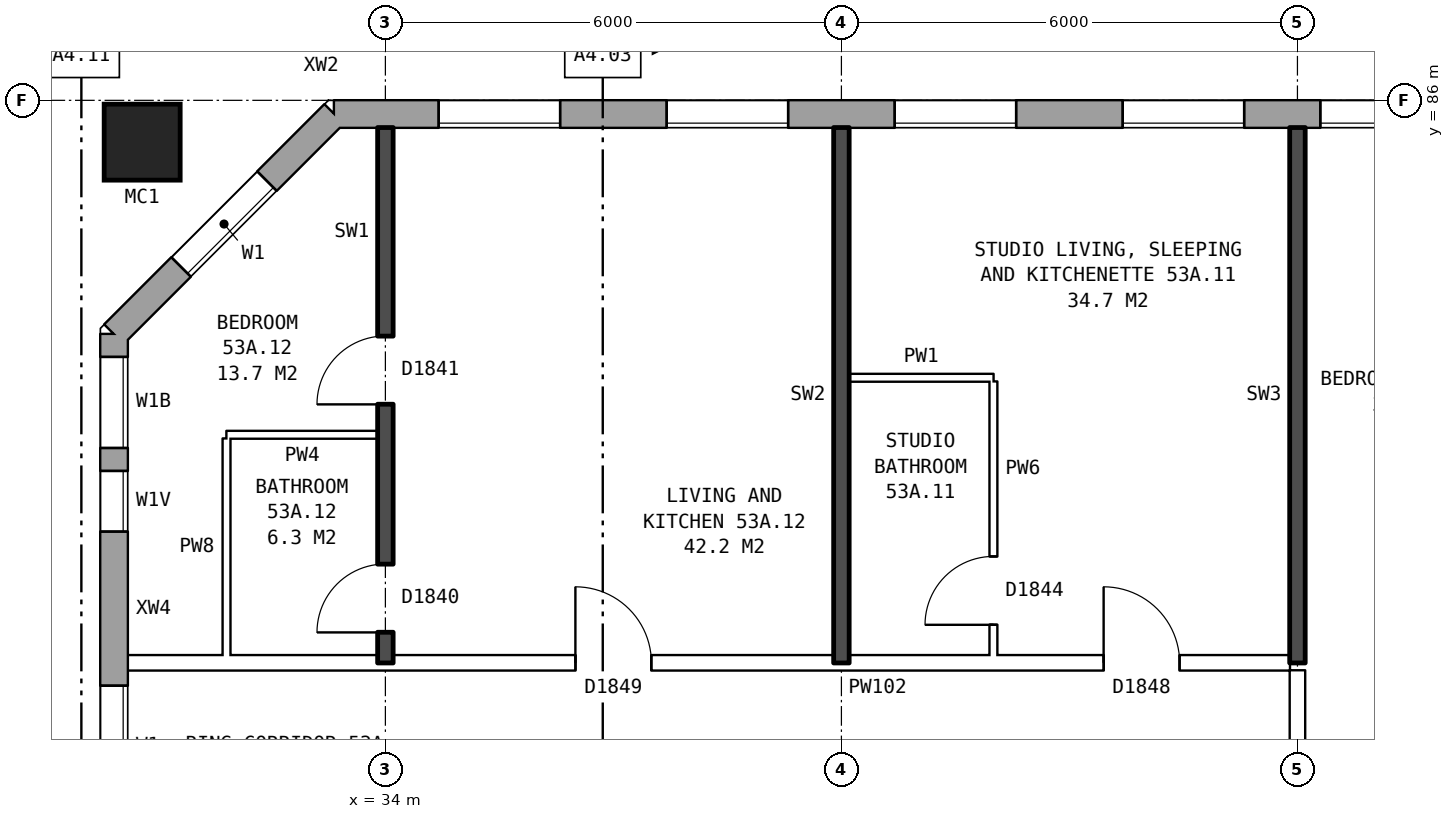
"""IFC4 building model, lengths in metres.
Left out: names, types, materials, properties, quantities, classifications, styles, units other than length and angle.
Written with IfcOpenShell. Run it as: python <this file> out.ifc"""

import sys

from ifc_helpers import new_model, si_unit, direction, frame, frame_2d, origin, origin_2d, place, context, subcontext, project, spatial, rectangle, hollow_rectangle, extrude, element, fill, save


model = new_model("IFC4")
c1 = context("Model", 3, precision=1e-05, world=origin(), true_north=direction((0.0, 1.0)))
c2 = subcontext(c1, "Body", "Model", "MODEL_VIEW")
j1 = project(units=[si_unit("LENGTHUNIT", "METRE"), si_unit("PLANEANGLEUNIT", "RADIAN")], contexts=[c1])
p1 = place(None, origin())
s1 = spatial("IfcSite", under=j1, at=p1, CompositionType="ELEMENT")
p2 = place(p1, origin())
s2 = spatial("IfcBuilding", under=s1, at=p2, CompositionType="ELEMENT")
p3 = place(p2, frame((0.0, 0.0, 188.2)))
s3 = spatial("IfcBuildingStorey", under=s2, at=p3, CompositionType="ELEMENT", Elevation=188.2)
p4 = place(p3, frame((30.8, 85.45, 0.0), z_axis=(0.0, 0.0, 1.0), x_axis=(1.0, 0.0, 0.0)))
e1 = element("IfcColumn", 1, at=p4, inside=s3, PredefinedType="COLUMN", context=c2, shape_type="SweptSolid", body=[
    extrude(hollow_rectangle(XDim=1.0, YDim=1.0, WallThickness=0.055, at=origin_2d()), origin(), (0.0, 0.0, 1.0), 3.1),
])
p5 = place(p3, frame((72.925, 85.82, 0.0), z_axis=(0.0, 0.0, 1.0), x_axis=(-1.0, 0.0, 0.0)))
e2 = element("IfcWall", 2, at=p5, inside=s3, PredefinedType="STANDARD", context=c2, shape_type="SweptSolid", body=[
    extrude(rectangle(XDim=39.601, YDim=0.36, at=frame_2d((19.8, 0.0))), origin(), (0.0, 0.0, 1.0), 2.85),
])
p6 = place(p5, frame((0.625, 0.0, 0.8)))
e3 = element("IfcOpeningElement", 3, at=p6, cuts=e2, PredefinedType="OPENING", context=c2, shape_type="SweptSolid", body=[
    extrude(rectangle(XDim=1.6, YDim=1.8, at=frame_2d((0.8, 0.9))), frame((0.0, 0.19, 0.0), z_axis=(0.0, -1.0, 0.0), x_axis=(1.0, 0.0, 0.0)), (0.0, 0.0, 1.0), 0.38),
])
p7 = place(p5, frame((3.625, 0.0, 0.8)))
e4 = element("IfcOpeningElement", 4, at=p7, cuts=e2, PredefinedType="OPENING", context=c2, shape_type="SweptSolid", body=[
    extrude(rectangle(XDim=1.6, YDim=1.8, at=frame_2d((0.8, 0.9))), frame((0.0, 0.19, 0.0), z_axis=(0.0, -1.0, 0.0), x_axis=(1.0, 0.0, 0.0)), (0.0, 0.0, 1.0), 0.38),
])
p8 = place(p5, frame((6.625, 0.0, 0.8)))
e5 = element("IfcOpeningElement", 5, at=p8, cuts=e2, PredefinedType="OPENING", context=c2, shape_type="SweptSolid", body=[
    extrude(rectangle(XDim=1.6, YDim=1.8, at=frame_2d((0.8, 0.9))), frame((0.0, 0.19, 0.0), z_axis=(0.0, -1.0, 0.0), x_axis=(1.0, 0.0, 0.0)), (0.0, 0.0, 1.0), 0.38),
])
p9 = place(p5, frame((9.625, 0.0, 0.8)))
e6 = element("IfcOpeningElement", 6, at=p9, cuts=e2, PredefinedType="OPENING", context=c2, shape_type="SweptSolid", body=[
    extrude(rectangle(XDim=1.6, YDim=1.8, at=frame_2d((0.8, 0.9))), frame((0.0, 0.19, 0.0), z_axis=(0.0, -1.0, 0.0), x_axis=(1.0, 0.0, 0.0)), (0.0, 0.0, 1.0), 0.38),
])
p10 = place(p5, frame((12.625, 0.0, 0.8)))
e7 = element("IfcOpeningElement", 7, at=p10, cuts=e2, PredefinedType="OPENING", context=c2, shape_type="SweptSolid", body=[
    extrude(rectangle(XDim=1.6, YDim=1.8, at=frame_2d((0.8, 0.9))), frame((0.0, 0.19, 0.0), z_axis=(0.0, -1.0, 0.0), x_axis=(1.0, 0.0, 0.0)), (0.0, 0.0, 1.0), 0.38),
])
p11 = place(p5, frame((15.575, 0.0, 0.15)))
e8 = element("IfcOpeningElement", 8, at=p11, cuts=e2, PredefinedType="OPENING", context=c2, shape_type="SweptSolid", body=[
    extrude(rectangle(XDim=0.6, YDim=0.9, at=frame_2d((0.3, 0.45))), frame((0.0, 0.19, 0.0), z_axis=(0.0, -1.0, 0.0), x_axis=(1.0, 0.0, 0.0)), (0.0, 0.0, 1.0), 0.38),
])
p12 = place(p5, frame((18.625, 0.0, 0.8)))
e9 = element("IfcOpeningElement", 9, at=p12, cuts=e2, PredefinedType="OPENING", context=c2, shape_type="SweptSolid", body=[
    extrude(rectangle(XDim=1.6, YDim=1.8, at=frame_2d((0.8, 0.9))), frame((0.0, 0.19, 0.0), z_axis=(0.0, -1.0, 0.0), x_axis=(1.0, 0.0, 0.0)), (0.0, 0.0, 1.0), 0.38),
])
p13 = place(p5, frame((21.125, 0.0, 0.8)))
e10 = element("IfcOpeningElement", 10, at=p13, cuts=e2, PredefinedType="OPENING", context=c2, shape_type="SweptSolid", body=[
    extrude(rectangle(XDim=1.2, YDim=1.8, at=frame_2d((0.6, 0.9))), frame((0.0, 0.19, 0.0), z_axis=(0.0, -1.0, 0.0), x_axis=(1.0, 0.0, 0.0)), (0.0, 0.0, 1.0), 0.38),
])
p14 = place(p5, frame((24.525, 0.0, 1.7)))
e11 = element("IfcOpeningElement", 11, at=p14, cuts=e2, PredefinedType="OPENING", context=c2, shape_type="SweptSolid", body=[
    extrude(rectangle(XDim=0.6, YDim=0.9, at=frame_2d((0.3, 0.45))), frame((0.0, 0.19, 0.0), z_axis=(0.0, -1.0, 0.0), x_axis=(1.0, 0.0, 0.0)), (0.0, 0.0, 1.0), 0.38),
])
p15 = place(p5, frame((27.625, 0.0, 0.8)))
e12 = element("IfcOpeningElement", 12, at=p15, cuts=e2, PredefinedType="OPENING", context=c2, shape_type="SweptSolid", body=[
    extrude(rectangle(XDim=1.6, YDim=1.8, at=frame_2d((0.8, 0.9))), frame((0.0, 0.19, 0.0), z_axis=(0.0, -1.0, 0.0), x_axis=(1.0, 0.0, 0.0)), (0.0, 0.0, 1.0), 0.38),
])
p16 = place(p5, frame((30.625, 0.0, 0.8)))
e13 = element("IfcOpeningElement", 13, at=p16, cuts=e2, PredefinedType="OPENING", context=c2, shape_type="SweptSolid", body=[
    extrude(rectangle(XDim=1.6, YDim=1.8, at=frame_2d((0.8, 0.9))), frame((0.0, 0.19, 0.0), z_axis=(0.0, -1.0, 0.0), x_axis=(1.0, 0.0, 0.0)), (0.0, 0.0, 1.0), 0.38),
])
p17 = place(p5, frame((33.625, 0.0, 0.8)))
e14 = element("IfcOpeningElement", 14, at=p17, cuts=e2, PredefinedType="OPENING", context=c2, shape_type="SweptSolid", body=[
    extrude(rectangle(XDim=1.6, YDim=1.8, at=frame_2d((0.8, 0.9))), frame((0.0, 0.19, 0.0), z_axis=(0.0, -1.0, 0.0), x_axis=(1.0, 0.0, 0.0)), (0.0, 0.0, 1.0), 0.38),
])
p18 = place(p5, frame((36.625, 0.0, 0.8)))
e15 = element("IfcOpeningElement", 15, at=p18, cuts=e2, PredefinedType="OPENING", context=c2, shape_type="SweptSolid", body=[
    extrude(rectangle(XDim=1.6, YDim=1.8, at=frame_2d((0.8, 0.9))), frame((0.0, 0.19, 0.0), z_axis=(0.0, -1.0, 0.0), x_axis=(1.0, 0.0, 0.0)), (0.0, 0.0, 1.0), 0.38),
])
p19 = place(p5, frame((16.475, 0.0, 0.15)))
e16 = element("IfcOpeningElement", 16, at=p19, cuts=e2, PredefinedType="OPENING", context=c2, shape_type="SweptSolid", body=[
    extrude(rectangle(XDim=1.2, YDim=1.8, at=frame_2d((0.6, 0.9))), frame((0.0, 0.19, 0.0), z_axis=(0.0, -1.0, 0.0), x_axis=(1.0, 0.0, 0.0)), (0.0, 0.0, 1.0), 0.38),
])
p20 = place(p5, frame((22.625, 0.0, 0.8)))
e17 = element("IfcOpeningElement", 17, at=p20, cuts=e2, PredefinedType="OPENING", context=c2, shape_type="SweptSolid", body=[
    extrude(rectangle(XDim=0.6, YDim=0.9, at=frame_2d((0.3, 0.45))), frame((0.0, 0.19, 0.0), z_axis=(0.0, -1.0, 0.0), x_axis=(1.0, 0.0, 0.0)), (0.0, 0.0, 1.0), 0.38),
])
p21 = place(p5, frame((25.425, 0.0, 0.8)))
e18 = element("IfcOpeningElement", 18, at=p21, cuts=e2, PredefinedType="OPENING", context=c2, shape_type="SweptSolid", body=[
    extrude(rectangle(XDim=1.2, YDim=1.8, at=frame_2d((0.6, 0.9))), frame((0.0, 0.19, 0.0), z_axis=(0.0, -1.0, 0.0), x_axis=(1.0, 0.0, 0.0)), (0.0, 0.0, 1.0), 0.38),
])
p22 = place(p3, frame((33.325, 85.82, 0.0), z_axis=(0.0, 0.0, 1.0), x_axis=(-0.707106781187, -0.707106781187, 0.0)))
e19 = element("IfcWall", 19, at=p22, inside=s3, PredefinedType="STANDARD", context=c2, shape_type="SweptSolid", body=[
    extrude(rectangle(XDim=4.094, YDim=0.36, at=frame_2d((2.047, 0.0))), origin(), (0.0, 0.0, 1.0), 2.85),
])
p23 = place(p22, frame((1.247, 0.0, 0.8)))
e20 = element("IfcOpeningElement", 20, at=p23, cuts=e19, PredefinedType="OPENING", context=c2, shape_type="SweptSolid", body=[
    extrude(rectangle(XDim=1.6, YDim=1.8, at=frame_2d((0.8, 0.9))), frame((0.0, 0.19, 0.0), z_axis=(0.0, -1.0, 0.0), x_axis=(1.0, 0.0, 0.0)), (0.0, 0.0, 1.0), 0.38),
])
p24 = place(p3, frame((30.43, 82.925, 0.0), z_axis=(0.0, 0.0, 1.0), x_axis=(0.0, -1.0, 0.0)))
e21 = element("IfcWall", 21, at=p24, inside=s3, PredefinedType="STANDARD", context=c2, shape_type="SweptSolid", body=[
    extrude(rectangle(XDim=25.851, YDim=0.36, at=frame_2d((12.925, 0.0))), origin(), (0.0, 0.0, 1.0), 2.85),
])
p25 = place(p24, frame((0.3, 0.0, 0.8)))
e22 = element("IfcOpeningElement", 22, at=p25, cuts=e21, PredefinedType="OPENING", context=c2, shape_type="SweptSolid", body=[
    extrude(rectangle(XDim=1.2, YDim=1.8, at=frame_2d((0.6, 0.9))), frame((0.0, 0.19, 0.0), z_axis=(0.0, -1.0, 0.0), x_axis=(1.0, 0.0, 0.0)), (0.0, 0.0, 1.0), 0.38),
])
p26 = place(p24, frame((4.625, 0.0, 0.8)))
e23 = element("IfcOpeningElement", 23, at=p26, cuts=e21, PredefinedType="OPENING", context=c2, shape_type="SweptSolid", body=[
    extrude(rectangle(XDim=1.6, YDim=1.8, at=frame_2d((0.8, 0.9))), frame((0.0, 0.19, 0.0), z_axis=(0.0, -1.0, 0.0), x_axis=(1.0, 0.0, 0.0)), (0.0, 0.0, 1.0), 0.38),
])
p27 = place(p24, frame((7.625, 0.0, 0.8)))
e24 = element("IfcOpeningElement", 24, at=p27, cuts=e21, PredefinedType="OPENING", context=c2, shape_type="SweptSolid", body=[
    extrude(rectangle(XDim=1.6, YDim=1.8, at=frame_2d((0.8, 0.9))), frame((0.0, 0.19, 0.0), z_axis=(0.0, -1.0, 0.0), x_axis=(1.0, 0.0, 0.0)), (0.0, 0.0, 1.0), 0.38),
])
p28 = place(p24, frame((10.625, 0.0, 0.8)))
e25 = element("IfcOpeningElement", 25, at=p28, cuts=e21, PredefinedType="OPENING", context=c2, shape_type="SweptSolid", body=[
    extrude(rectangle(XDim=1.6, YDim=1.8, at=frame_2d((0.8, 0.9))), frame((0.0, 0.19, 0.0), z_axis=(0.0, -1.0, 0.0), x_axis=(1.0, 0.0, 0.0)), (0.0, 0.0, 1.0), 0.38),
])
p29 = place(p24, frame((13.625, 0.0, 0.8)))
e26 = element("IfcOpeningElement", 26, at=p29, cuts=e21, PredefinedType="OPENING", context=c2, shape_type="SweptSolid", body=[
    extrude(rectangle(XDim=1.6, YDim=1.8, at=frame_2d((0.8, 0.9))), frame((0.0, 0.19, 0.0), z_axis=(0.0, -1.0, 0.0), x_axis=(1.0, 0.0, 0.0)), (0.0, 0.0, 1.0), 0.38),
])
p30 = place(p24, frame((16.625, 0.0, 0.8)))
e27 = element("IfcOpeningElement", 27, at=p30, cuts=e21, PredefinedType="OPENING", context=c2, shape_type="SweptSolid", body=[
    extrude(rectangle(XDim=1.6, YDim=1.8, at=frame_2d((0.8, 0.9))), frame((0.0, 0.19, 0.0), z_axis=(0.0, -1.0, 0.0), x_axis=(1.0, 0.0, 0.0)), (0.0, 0.0, 1.0), 0.38),
])
p31 = place(p24, frame((19.625, 0.0, 0.8)))
e28 = element("IfcOpeningElement", 28, at=p31, cuts=e21, PredefinedType="OPENING", context=c2, shape_type="SweptSolid", body=[
    extrude(rectangle(XDim=1.6, YDim=1.8, at=frame_2d((0.8, 0.9))), frame((0.0, 0.19, 0.0), z_axis=(0.0, -1.0, 0.0), x_axis=(1.0, 0.0, 0.0)), (0.0, 0.0, 1.0), 0.38),
])
p32 = place(p24, frame((23.075, 0.0, 0.8)))
e29 = element("IfcOpeningElement", 29, at=p32, cuts=e21, PredefinedType="OPENING", context=c2, shape_type="SweptSolid", body=[
    extrude(rectangle(XDim=1.0, YDim=0.9, at=frame_2d((0.5, 0.45))), frame((0.0, 0.19, 0.0), z_axis=(0.0, -1.0, 0.0), x_axis=(1.0, 0.0, 0.0)), (0.0, 0.0, 1.0), 0.38),
])
p33 = place(p24, frame((1.8, 0.0, 0.8)))
e30 = element("IfcOpeningElement", 30, at=p33, cuts=e21, PredefinedType="OPENING", context=c2, shape_type="SweptSolid", body=[
    extrude(rectangle(XDim=0.8, YDim=0.9, at=frame_2d((0.4, 0.45))), frame((0.0, 0.19, 0.0), z_axis=(0.0, -1.0, 0.0), x_axis=(1.0, 0.0, 0.0)), (0.0, 0.0, 1.0), 0.38),
])
p34 = place(p24, frame((24.375, 0.0, 0.8)))
e31 = element("IfcOpeningElement", 31, at=p34, cuts=e21, PredefinedType="OPENING", context=c2, shape_type="SweptSolid", body=[
    extrude(rectangle(XDim=1.0, YDim=1.8, at=frame_2d((0.5, 0.9))), frame((0.0, 0.19, 0.0), z_axis=(0.0, -1.0, 0.0), x_axis=(1.0, 0.0, 0.0)), (0.0, 0.0, 1.0), 0.38),
])
p35 = place(p3, frame((30.61, 78.6, 0.0), z_axis=(0.0, 0.0, 1.0), x_axis=(1.0, 0.0, 0.0)))
e32 = element("IfcWall", 32, at=p35, inside=s3, PredefinedType="PARTITIONING", context=c2, shape_type="SweptSolid", body=[
    extrude(rectangle(XDim=15.29, YDim=0.2, at=frame_2d((7.645, 0.0))), origin(), (0.0, 0.0, 1.0), 2.85),
])
p36 = place(p35, frame((12.84, 0.0, 0.0)))
e33 = element("IfcOpeningElement", 33, at=p36, cuts=e32, PredefinedType="OPENING", context=c2, shape_type="SweptSolid", body=[
    extrude(rectangle(XDim=1.0, YDim=2.1, at=frame_2d((0.5, 1.05))), frame((0.0, 0.11, 0.0), z_axis=(0.0, -1.0, 0.0), x_axis=(1.0, 0.0, 0.0)), (0.0, 0.0, 1.0), 0.22),
])
p37 = place(p35, frame((5.89, 0.0, 0.0)))
e34 = element("IfcOpeningElement", 34, at=p37, cuts=e32, PredefinedType="OPENING", context=c2, shape_type="SweptSolid", body=[
    extrude(rectangle(XDim=1.0, YDim=2.1, at=frame_2d((0.5, 1.05))), frame((0.0, 0.11, 0.0), z_axis=(0.0, -1.0, 0.0), x_axis=(1.0, 0.0, 0.0)), (0.0, 0.0, 1.0), 0.22),
])
p38 = place(p3, frame((31.91, 81.6, 0.0), z_axis=(0.0, 0.0, 1.0), x_axis=(1.0, 0.0, 0.0)))
e35 = element("IfcWall", 35, at=p38, inside=s3, PredefinedType="PARTITIONING", context=c2, shape_type="SweptSolid", body=[
    extrude(rectangle(XDim=1.99, YDim=0.1, at=frame_2d((0.995, 0.0))), origin(), (0.0, 0.0, 1.0), 2.85),
])
p39 = place(p3, frame((40.1, 82.35, 0.0), z_axis=(0.0, 0.0, 1.0), x_axis=(1.0, 0.0, 0.0)))
e36 = element("IfcWall", 36, at=p39, inside=s3, PredefinedType="PARTITIONING", context=c2, shape_type="SweptSolid", body=[
    extrude(rectangle(XDim=1.9, YDim=0.1, at=frame_2d((0.95, 0.0))), origin(), (0.0, 0.0, 1.0), 2.85),
])
p40 = place(p3, frame((31.91, 78.7, 0.0), z_axis=(0.0, 0.0, 1.0), x_axis=(0.0, 1.0, 0.0)))
e37 = element("IfcWall", 37, at=p40, inside=s3, PredefinedType="PARTITIONING", context=c2, shape_type="SweptSolid", body=[
    extrude(rectangle(XDim=2.85, YDim=0.1, at=frame_2d((1.425, 0.0))), origin(), (0.0, 0.0, 1.0), 2.85),
])
p41 = place(p3, frame((34.0, 78.6, 0.0), z_axis=(0.0, 0.0, 1.0), x_axis=(0.0, 1.0, 0.0)))
e38 = element("IfcWall", 38, at=p41, inside=s3, PredefinedType="SOLIDWALL", context=c2, shape_type="SweptSolid", body=[
    extrude(rectangle(XDim=7.04, YDim=0.2, at=frame_2d((3.52, 0.0))), origin(), (0.0, 0.0, 1.0), 2.85),
])
p42 = place(p41, frame((3.4, 0.0, 0.0)))
e39 = element("IfcOpeningElement", 39, at=p42, cuts=e38, PredefinedType="OPENING", context=c2, shape_type="SweptSolid", body=[
    extrude(rectangle(XDim=0.9, YDim=2.1, at=frame_2d((0.45, 1.05))), frame((0.0, 0.11, 0.0), z_axis=(0.0, -1.0, 0.0), x_axis=(1.0, 0.0, 0.0)), (0.0, 0.0, 1.0), 0.22),
])
p43 = place(p41, frame((0.4, 0.0, 0.0)))
e40 = element("IfcOpeningElement", 40, at=p43, cuts=e38, PredefinedType="OPENING", context=c2, shape_type="SweptSolid", body=[
    extrude(rectangle(XDim=0.9, YDim=2.1, at=frame_2d((0.45, 1.05))), frame((0.0, 0.11, 0.0), z_axis=(0.0, -1.0, 0.0), x_axis=(1.0, 0.0, 0.0)), (0.0, 0.0, 1.0), 0.22),
])
p44 = place(p3, frame((40.0, 78.6, 0.0), z_axis=(0.0, 0.0, 1.0), x_axis=(0.0, 1.0, 0.0)))
e41 = element("IfcWall", 41, at=p44, inside=s3, PredefinedType="SOLIDWALL", context=c2, shape_type="SweptSolid", body=[
    extrude(rectangle(XDim=7.04, YDim=0.2, at=frame_2d((3.52, 0.0))), origin(), (0.0, 0.0, 1.0), 2.85),
])
p45 = place(p3, frame((42.0, 78.7, 0.0), z_axis=(0.0, 0.0, 1.0), x_axis=(0.0, 1.0, 0.0)))
e42 = element("IfcWall", 42, at=p45, inside=s3, PredefinedType="PARTITIONING", context=c2, shape_type="SweptSolid", body=[
    extrude(rectangle(XDim=3.6, YDim=0.1, at=frame_2d((1.8, 0.0))), origin(), (0.0, 0.0, 1.0), 2.85),
])
p46 = place(p45, frame((0.4, 0.0, 0.0)))
e43 = element("IfcOpeningElement", 43, at=p46, cuts=e42, PredefinedType="OPENING", context=c2, shape_type="SweptSolid", body=[
    extrude(rectangle(XDim=0.9, YDim=2.1, at=frame_2d((0.45, 1.05))), frame((0.0, 0.06, 0.0), z_axis=(0.0, -1.0, 0.0), x_axis=(1.0, 0.0, 0.0)), (0.0, 0.0, 1.0), 0.12),
])
p47 = place(p3, frame((46.0, 76.3, 0.0), z_axis=(0.0, 0.0, 1.0), x_axis=(0.0, 1.0, 0.0)))
e44 = element("IfcWall", 44, at=p47, inside=s3, PredefinedType="PARTITIONING", context=c2, shape_type="SweptSolid", body=[
    extrude(rectangle(XDim=2.2, YDim=0.2, at=frame_2d((1.1, 0.0))), origin(), (0.0, 0.0, 1.0), 2.85),
])
p48 = place(p3, frame((46.0, 78.6, 0.0), z_axis=(0.0, 0.0, 1.0), x_axis=(0.0, 1.0, 0.0)))
e45 = element("IfcWall", 45, at=p48, inside=s3, PredefinedType="SOLIDWALL", context=c2, shape_type="SweptSolid", body=[
    extrude(rectangle(XDim=7.04, YDim=0.2, at=frame_2d((3.52, 0.0))), origin(), (0.0, 0.0, 1.0), 2.85),
])
p49 = place(p15, origin())
e46 = element("IfcWindow", 46, at=p49, inside=s3, PartitioningType="SINGLE_PANEL", PredefinedType="WINDOW", context=c2, shape_type="SweptSolid", body=[
    extrude(rectangle(XDim=1.6, YDim=1.8, at=frame_2d((0.8, 0.9))), frame((0.0, 0.15, 0.0), z_axis=(0.0, -1.0, 0.0), x_axis=(1.0, 0.0, 0.0)), (0.0, 0.0, 1.0), 0.06),
])
fill(e12, e46)
p50 = place(p16, origin())
e47 = element("IfcWindow", 47, at=p50, inside=s3, PartitioningType="SINGLE_PANEL", PredefinedType="WINDOW", context=c2, shape_type="SweptSolid", body=[
    extrude(rectangle(XDim=1.6, YDim=1.8, at=frame_2d((0.8, 0.9))), frame((0.0, 0.15, 0.0), z_axis=(0.0, -1.0, 0.0), x_axis=(1.0, 0.0, 0.0)), (0.0, 0.0, 1.0), 0.06),
])
fill(e13, e47)
p51 = place(p17, origin())
e48 = element("IfcWindow", 48, at=p51, inside=s3, PartitioningType="SINGLE_PANEL", PredefinedType="WINDOW", context=c2, shape_type="SweptSolid", body=[
    extrude(rectangle(XDim=1.6, YDim=1.8, at=frame_2d((0.8, 0.9))), frame((0.0, 0.15, 0.0), z_axis=(0.0, -1.0, 0.0), x_axis=(1.0, 0.0, 0.0)), (0.0, 0.0, 1.0), 0.06),
])
fill(e14, e48)
p52 = place(p18, origin())
e49 = element("IfcWindow", 49, at=p52, inside=s3, PartitioningType="SINGLE_PANEL", PredefinedType="WINDOW", context=c2, shape_type="SweptSolid", body=[
    extrude(rectangle(XDim=1.6, YDim=1.8, at=frame_2d((0.8, 0.9))), frame((0.0, 0.15, 0.0), z_axis=(0.0, -1.0, 0.0), x_axis=(1.0, 0.0, 0.0)), (0.0, 0.0, 1.0), 0.06),
])
fill(e15, e49)
p53 = place(p23, origin())
e50 = element("IfcWindow", 50, at=p53, inside=s3, PartitioningType="SINGLE_PANEL", PredefinedType="WINDOW", context=c2, shape_type="SweptSolid", body=[
    extrude(rectangle(XDim=1.6, YDim=1.8, at=frame_2d((0.8, 0.9))), frame((0.0, 0.15, 0.0), z_axis=(0.0, -1.0, 0.0), x_axis=(1.0, 0.0, 0.0)), (0.0, 0.0, 1.0), 0.06),
])
fill(e20, e50)
p54 = place(p25, origin())
e51 = element("IfcWindow", 51, at=p54, inside=s3, PartitioningType="SINGLE_PANEL", PredefinedType="WINDOW", context=c2, shape_type="SweptSolid", body=[
    extrude(rectangle(XDim=1.2, YDim=1.8, at=frame_2d((0.6, 0.9))), frame((0.0, 0.15, 0.0), z_axis=(0.0, -1.0, 0.0), x_axis=(1.0, 0.0, 0.0)), (0.0, 0.0, 1.0), 0.06),
])
fill(e22, e51)
p55 = place(p26, origin())
e52 = element("IfcWindow", 52, at=p55, inside=s3, PartitioningType="SINGLE_PANEL", PredefinedType="WINDOW", context=c2, shape_type="SweptSolid", body=[
    extrude(rectangle(XDim=1.6, YDim=1.8, at=frame_2d((0.8, 0.9))), frame((0.0, 0.15, 0.0), z_axis=(0.0, -1.0, 0.0), x_axis=(1.0, 0.0, 0.0)), (0.0, 0.0, 1.0), 0.06),
])
fill(e23, e52)
p56 = place(p36, origin())
e53 = element("IfcDoor", 53, at=p56, inside=s3, OperationType="SINGLE_SWING_LEFT", PredefinedType="DOOR", context=c2, shape_type="SweptSolid", body=[
    extrude(rectangle(XDim=1.0, YDim=2.1, at=frame_2d((0.5, 1.05))), frame((0.0, 0.025, 0.0), z_axis=(0.0, -1.0, 0.0), x_axis=(1.0, 0.0, 0.0)), (0.0, 0.0, 1.0), 0.05),
])
fill(e33, e53)
p57 = place(p46, origin())
e54 = element("IfcDoor", 54, at=p57, inside=s3, OperationType="SINGLE_SWING_LEFT", PredefinedType="DOOR", context=c2, shape_type="SweptSolid", body=[
    extrude(rectangle(XDim=0.9, YDim=2.1, at=frame_2d((0.45, 1.05))), frame((0.0, 0.025, 0.0), z_axis=(0.0, -1.0, 0.0), x_axis=(1.0, 0.0, 0.0)), (0.0, 0.0, 1.0), 0.05),
])
fill(e43, e54)
p58 = place(p42, origin())
e55 = element("IfcDoor", 55, at=p58, inside=s3, OperationType="SINGLE_SWING_LEFT", PredefinedType="DOOR", context=c2, shape_type="SweptSolid", body=[
    extrude(rectangle(XDim=0.9, YDim=2.1, at=frame_2d((0.45, 1.05))), frame((0.0, 0.025, 0.0), z_axis=(0.0, -1.0, 0.0), x_axis=(1.0, 0.0, 0.0)), (0.0, 0.0, 1.0), 0.05),
])
fill(e39, e55)
p59 = place(p37, origin())
e56 = element("IfcDoor", 56, at=p59, inside=s3, OperationType="SINGLE_SWING_LEFT", PredefinedType="DOOR", context=c2, shape_type="SweptSolid", body=[
    extrude(rectangle(XDim=1.0, YDim=2.1, at=frame_2d((0.5, 1.05))), frame((0.0, 0.025, 0.0), z_axis=(0.0, -1.0, 0.0), x_axis=(1.0, 0.0, 0.0)), (0.0, 0.0, 1.0), 0.05),
])
fill(e34, e56)
p60 = place(p43, origin())
e57 = element("IfcDoor", 57, at=p60, inside=s3, OperationType="SINGLE_SWING_LEFT", PredefinedType="DOOR", context=c2, shape_type="SweptSolid", body=[
    extrude(rectangle(XDim=0.9, YDim=2.1, at=frame_2d((0.45, 1.05))), frame((0.0, 0.025, 0.0), z_axis=(0.0, -1.0, 0.0), x_axis=(1.0, 0.0, 0.0)), (0.0, 0.0, 1.0), 0.05),
])
fill(e40, e57)
p61 = place(p21, origin())
e58 = element("IfcWindow", 58, at=p61, inside=s3, PartitioningType="SINGLE_PANEL", PredefinedType="WINDOW", context=c2, shape_type="SweptSolid", body=[
    extrude(rectangle(XDim=1.2, YDim=1.8, at=frame_2d((0.6, 0.9))), frame((0.0, 0.15, 0.0), z_axis=(0.0, -1.0, 0.0), x_axis=(1.0, 0.0, 0.0)), (0.0, 0.0, 1.0), 0.06),
])
fill(e18, e58)
p62 = place(p33, origin())
e59 = element("IfcWindow", 59, at=p62, inside=s3, PartitioningType="SINGLE_PANEL", PredefinedType="WINDOW", context=c2, shape_type="SweptSolid", body=[
    extrude(rectangle(XDim=0.8, YDim=0.9, at=frame_2d((0.4, 0.45))), frame((0.0, 0.15, 0.0), z_axis=(0.0, -1.0, 0.0), x_axis=(1.0, 0.0, 0.0)), (0.0, 0.0, 1.0), 0.06),
])
fill(e30, e59)
save(model, sys.argv[1])
